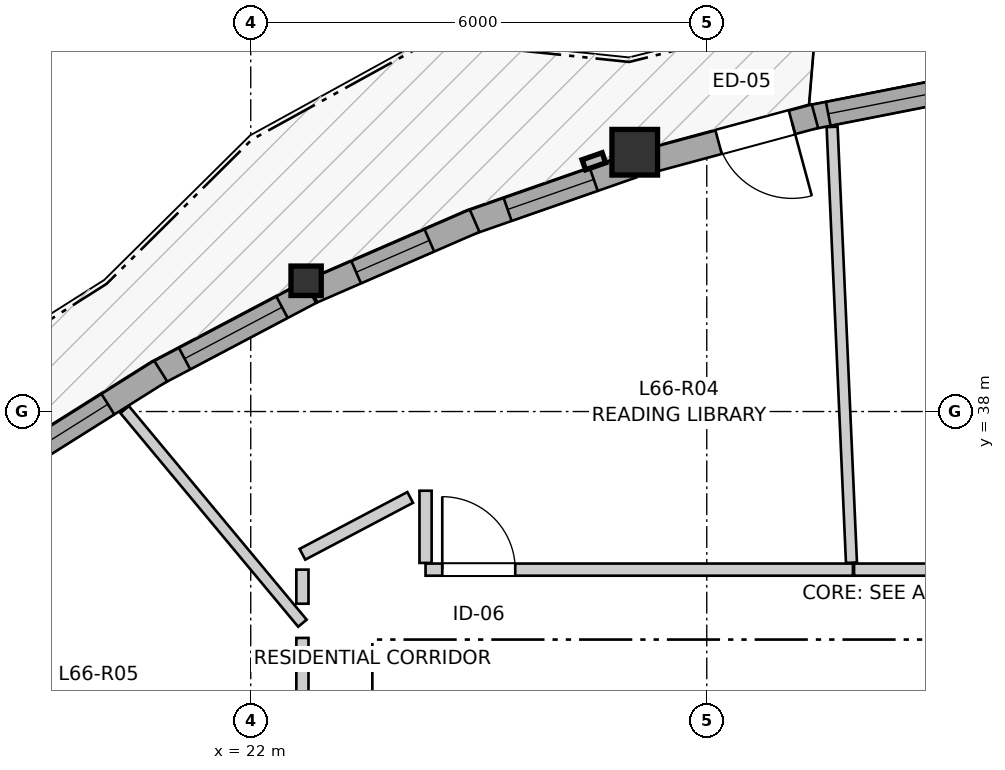
"""IFC4 building model, lengths in metres.
Left out: names, types, materials, properties, quantities, classifications, styles, units other than length and angle.
Written with IfcOpenShell. Run it as: python <this file> out.ifc"""

import sys

from ifc_helpers import new_model, si_unit, direction, frame, frame_2d, origin, origin_2d, place, context, subcontext, project, spatial, rectangle, i_section, extrude, source, transform, mapped, element, fill, save


model = new_model("IFC4")
c1 = context("Model", 3, precision=1e-05, world=origin(), true_north=direction((0.0, 1.0)))
c2 = subcontext(c1, "Body", "Model", "MODEL_VIEW")
j1 = project(units=[si_unit("LENGTHUNIT", "METRE"), si_unit("PLANEANGLEUNIT", "RADIAN")], contexts=[c1])
p1 = place(None, origin())
s1 = spatial("IfcSite", under=j1, at=p1, CompositionType="ELEMENT")
p2 = place(p1, origin())
s2 = spatial("IfcBuilding", under=s1, at=p2, CompositionType="ELEMENT")
p3 = place(p2, frame((0.0, 0.0, 221.2)))
s3 = spatial("IfcBuildingStorey", under=s2, at=p3, CompositionType="ELEMENT", Elevation=221.2)
m1 = source(origin(), c2, "Body", "SweptSolid", [
    extrude(rectangle(XDim=0.6, YDim=0.6, at=origin_2d()), origin(), (0.0, 0.0, 1.0), 2.96),
])
p4 = place(p3, frame((27.052, 41.411, 0.0), z_axis=(0.0, 0.0, 1.0), x_axis=(1.0, 0.0, 0.0)))
e1 = element("IfcColumn", 1, at=p4, inside=s3, PredefinedType="COLUMN", context=c2, shape_type="MappedRepresentation", body=[
    mapped(m1, transform((0.0, 0.0, 0.0), x_axis=(1.0, 0.0, 0.0), y_axis=(0.0, 1.0, 0.0), z_axis=(0.0, 0.0, 1.0), scale=1.0)),
])
m2 = source(origin(), c2, "Body", "SweptSolid", [
    extrude(i_section(OverallWidth=0.398, OverallDepth=0.387, WebThickness=0.019, FlangeThickness=0.03, FilletRadius=0.015, at=origin_2d()), origin(), (0.0, 0.0, 1.0), 2.96),
])
p5 = place(p3, frame((22.729, 39.72, 0.0), z_axis=(0.0, 0.0, 1.0), x_axis=(1.0, 0.0, 0.0)))
e2 = element("IfcColumn", 2, at=p5, inside=s3, PredefinedType="PILASTER", context=c2, shape_type="MappedRepresentation", body=[
    mapped(m2, transform((0.0, 0.0, 0.0), x_axis=(1.0, 0.0, 0.0), y_axis=(0.0, 1.0, 0.0), z_axis=(0.0, 0.0, 1.0), scale=1.0)),
])
p6 = place(p3, frame((31.736, 42.337, 0.0), z_axis=(0.0, 0.0, 1.0), x_axis=(-0.981228566979, -0.192848384345, 0.0)))
e3 = element("IfcWall", 3, at=p6, inside=s3, PredefinedType="SOLIDWALL", context=c2, shape_type="SweptSolid", body=[
    extrude(rectangle(XDim=2.443, YDim=0.32, at=frame_2d((1.222, 0.0))), origin(), (0.0, 0.0, 1.0), 2.58),
])
p7 = place(p6, frame((0.679, 0.0, 0.82)))
e4 = element("IfcOpeningElement", 4, at=p7, cuts=e3, PredefinedType="OPENING", context=c2, shape_type="SweptSolid", body=[
    extrude(rectangle(XDim=1.5, YDim=1.45, at=frame_2d((0.75, 0.725))), frame((0.0, 0.17, 0.0), z_axis=(0.0, -1.0, 0.0), x_axis=(1.0, 0.0, 0.0)), (0.0, 0.0, 1.0), 0.34),
])
p8 = place(p3, frame((29.424, 41.885, 0.0), z_axis=(0.0, 0.0, 1.0), x_axis=(-0.965461343217, -0.260546338976, 0.0)))
e5 = element("IfcWall", 5, at=p8, inside=s3, PredefinedType="SOLIDWALL", context=c2, shape_type="SweptSolid", body=[
    extrude(rectangle(XDim=2.323, YDim=0.32, at=frame_2d((1.162, 0.0))), origin(), (0.0, 0.0, 1.0), 2.58),
])
p9 = place(p8, frame((0.313, 0.0, 0.0)))
e6 = element("IfcOpeningElement", 6, at=p9, cuts=e5, PredefinedType="OPENING", context=c2, shape_type="SweptSolid", body=[
    extrude(rectangle(XDim=1.0, YDim=2.1, at=frame_2d((0.5, 1.05))), frame((0.0, 0.17, 0.0), z_axis=(0.0, -1.0, 0.0), x_axis=(1.0, 0.0, 0.0)), (0.0, 0.0, 1.0), 0.34),
])
p10 = place(p3, frame((27.02, 41.23, 0.0), z_axis=(0.0, 0.0, 1.0), x_axis=(-0.944142960918, -0.329536142705, 0.0)))
e7 = element("IfcWall", 7, at=p10, inside=s3, PredefinedType="SOLIDWALL", context=c2, shape_type="SweptSolid", body=[
    extrude(rectangle(XDim=2.284, YDim=0.32, at=frame_2d((1.142, 0.0))), origin(), (0.0, 0.0, 1.0), 2.58),
])
p11 = place(p10, frame((0.537, 0.0, 0.82)))
e8 = element("IfcOpeningElement", 8, at=p11, cuts=e7, PredefinedType="OPENING", context=c2, shape_type="SweptSolid", body=[
    extrude(rectangle(XDim=1.2, YDim=1.45, at=frame_2d((0.6, 0.725))), frame((0.0, 0.17, 0.0), z_axis=(0.0, -1.0, 0.0), x_axis=(1.0, 0.0, 0.0)), (0.0, 0.0, 1.0), 0.34),
])
p12 = place(p3, frame((24.945, 40.51, 0.0), z_axis=(0.0, 0.0, 1.0), x_axis=(-0.917060051629, -0.39874912126, 0.0)))
e9 = element("IfcWall", 9, at=p12, inside=s3, PredefinedType="SOLIDWALL", context=c2, shape_type="SweptSolid", body=[
    extrude(rectangle(XDim=2.328, YDim=0.32, at=frame_2d((1.164, 0.0))), origin(), (0.0, 0.0, 1.0), 2.58),
])
p13 = place(p12, frame((0.649, 0.0, 0.82)))
e10 = element("IfcOpeningElement", 10, at=p13, cuts=e9, PredefinedType="OPENING", context=c2, shape_type="SweptSolid", body=[
    extrude(rectangle(XDim=1.05, YDim=1.45, at=frame_2d((0.525, 0.725))), frame((0.0, 0.17, 0.0), z_axis=(0.0, -1.0, 0.0), x_axis=(1.0, 0.0, 0.0)), (0.0, 0.0, 1.0), 0.34),
])
p14 = place(p3, frame((22.785, 39.57, 0.0), z_axis=(0.0, 0.0, 1.0), x_axis=(-0.884379914657, -0.466767786541, 0.0)))
e11 = element("IfcWall", 11, at=p14, inside=s3, PredefinedType="SOLIDWALL", context=c2, shape_type="SweptSolid", body=[
    extrude(rectangle(XDim=2.314, YDim=0.32, at=frame_2d((1.157, 0.0))), origin(), (0.0, 0.0, 1.0), 2.58),
])
p15 = place(p14, frame((0.422, 0.0, 0.82)))
e12 = element("IfcOpeningElement", 12, at=p15, cuts=e11, PredefinedType="OPENING", context=c2, shape_type="SweptSolid", body=[
    extrude(rectangle(XDim=1.45, YDim=1.25, at=frame_2d((0.725, 0.625))), frame((0.0, 0.17, 0.0), z_axis=(0.0, -1.0, 0.0), x_axis=(1.0, 0.0, 0.0)), (0.0, 0.0, 1.0), 0.34),
])
p16 = place(p3, frame((20.815, 38.533, 0.0), z_axis=(0.0, 0.0, 1.0), x_axis=(-0.846418054627, -0.532518991963, 0.0)))
e13 = element("IfcWall", 13, at=p16, inside=s3, PredefinedType="SOLIDWALL", context=c2, shape_type="SweptSolid", body=[
    extrude(rectangle(XDim=2.245, YDim=0.32, at=frame_2d((1.122, 0.0))), origin(), (0.0, 0.0, 1.0), 2.58),
])
p17 = place(p16, frame((0.82, 0.0, 0.82)))
e14 = element("IfcOpeningElement", 14, at=p17, cuts=e13, PredefinedType="OPENING", context=c2, shape_type="SweptSolid", body=[
    extrude(rectangle(XDim=1.05, YDim=1.45, at=frame_2d((0.525, 0.725))), frame((0.0, 0.17, 0.0), z_axis=(0.0, -1.0, 0.0), x_axis=(1.0, 0.0, 0.0)), (0.0, 0.0, 1.0), 0.34),
])
p18 = place(p3, frame((24.3, 35.92, 0.0), z_axis=(0.0, 0.0, 1.0), x_axis=(1.0, 0.0, 0.0)))
e15 = element("IfcWall", 15, at=p18, inside=s3, PredefinedType="PARTITIONING", context=c2, shape_type="SweptSolid", body=[
    extrude(rectangle(XDim=5.623, YDim=0.16, at=frame_2d((2.812, 0.0))), origin(), (0.0, 0.0, 1.0), 2.96),
])
p19 = place(p18, frame((0.22, 0.0, 0.0)))
e16 = element("IfcOpeningElement", 16, at=p19, cuts=e15, PredefinedType="OPENING", context=c2, shape_type="SweptSolid", body=[
    extrude(rectangle(XDim=0.96, YDim=2.1, at=frame_2d((0.48, 1.05))), frame((0.0, 0.09, 0.0), z_axis=(0.0, -1.0, 0.0), x_axis=(1.0, 0.0, 0.0)), (0.0, 0.0, 1.0), 0.18),
])
p20 = place(p3, frame((29.938, 35.92, 0.0), z_axis=(0.0, 0.0, 1.0), x_axis=(1.0, 0.0, 0.0)))
e17 = element("IfcWall", 17, at=p20, inside=s3, PredefinedType="PARTITIONING", context=c2, shape_type="SweptSolid", body=[
    extrude(rectangle(XDim=5.103, YDim=0.16, at=frame_2d((2.552, 0.0))), origin(), (0.0, 0.0, 1.0), 2.96),
])
p21 = place(p20, frame((1.878, 0.0, 0.0)))
e18 = element("IfcOpeningElement", 18, at=p21, cuts=e17, PredefinedType="OPENING", context=c2, shape_type="SweptSolid", body=[
    extrude(rectangle(XDim=1.3, YDim=2.1, at=frame_2d((0.65, 1.05))), frame((0.0, 0.09, 0.0), z_axis=(0.0, -1.0, 0.0), x_axis=(1.0, 0.0, 0.0)), (0.0, 0.0, 1.0), 0.18),
])
p22 = place(p3, frame((29.649, 41.745, 0.0), z_axis=(0.0, 0.0, 1.0), x_axis=(0.044327022296, -0.999017074476, 0.0)))
e19 = element("IfcWall", 19, at=p22, inside=s3, PredefinedType="PARTITIONING", context=c2, shape_type="SweptSolid", body=[
    extrude(rectangle(XDim=5.739, YDim=0.145, at=frame_2d((2.87, 0.0))), origin(), (0.0, 0.0, 1.0), 2.96),
])
p23 = place(p3, frame((20.341, 38.025, 0.0), z_axis=(0.0, 0.0, 1.0), x_axis=(0.639731122463, -0.768598784121, 0.0)))
e20 = element("IfcWall", 20, at=p23, inside=s3, PredefinedType="PARTITIONING", context=c2, shape_type="SweptSolid", body=[
    extrude(rectangle(XDim=3.656, YDim=0.145, at=frame_2d((1.828, 0.0))), origin(), (0.0, 0.0, 1.0), 2.96),
])
p24 = place(p3, frame((22.68, 36.122, 0.0), z_axis=(0.0, 0.0, 1.0), x_axis=(0.884468554818, 0.466599802335, 0.0)))
e21 = element("IfcWall", 21, at=p24, inside=s3, PredefinedType="PARTITIONING", context=c2, shape_type="SweptSolid", body=[
    extrude(rectangle(XDim=1.603, YDim=0.16, at=frame_2d((0.802, 0.0))), origin(), (0.0, 0.0, 1.0), 2.96),
])
p25 = place(p3, frame((24.3, 36.008, 0.0), z_axis=(0.0, 0.0, 1.0), x_axis=(0.0, 1.0, 0.0)))
e22 = element("IfcWall", 22, at=p25, inside=s3, PredefinedType="PARTITIONING", context=c2, shape_type="SweptSolid", body=[
    extrude(rectangle(XDim=0.95, YDim=0.16, at=frame_2d((0.475, 0.0))), origin(), (0.0, 0.0, 1.0), 2.96),
])
p26 = place(p3, frame((22.68, 34.315, 0.0), z_axis=(0.0, 0.0, 1.0), x_axis=(0.0, 1.0, 0.0)))
e23 = element("IfcWall", 23, at=p26, inside=s3, PredefinedType="PARTITIONING", context=c2, shape_type="SweptSolid", body=[
    extrude(rectangle(XDim=0.707, YDim=0.16, at=frame_2d((0.353, 0.0))), origin(), (0.0, 0.0, 1.0), 2.96),
])
p27 = place(p3, frame((22.68, 35.471, 0.0), z_axis=(0.0, 0.0, 1.0), x_axis=(0.0, 1.0, 0.0)))
e24 = element("IfcWall", 24, at=p27, inside=s3, PredefinedType="PARTITIONING", context=c2, shape_type="SweptSolid", body=[
    extrude(rectangle(XDim=0.448, YDim=0.16, at=frame_2d((0.224, 0.0))), origin(), (0.0, 0.0, 1.0), 2.96),
])
m3 = source(origin(), c2, "Body", "SweptSolid", [
    extrude(rectangle(XDim=1.5, YDim=1.45, at=frame_2d((0.75, 0.725))), frame((0.0, 0.03, 0.0), z_axis=(0.0, -1.0, 0.0), x_axis=(1.0, 0.0, 0.0)), (0.0, 0.0, 1.0), 0.06),
])
p28 = place(p7, origin())
e25 = element("IfcWindow", 25, at=p28, inside=s3, PartitioningType="SINGLE_PANEL", PredefinedType="WINDOW", context=c2, shape_type="MappedRepresentation", body=[
    mapped(m3, transform((0.0, 0.0, 0.0), x_axis=(1.0, 0.0, 0.0), y_axis=(0.0, 1.0, 0.0), z_axis=(0.0, 0.0, 1.0), scale=1.0)),
])
fill(e4, e25)
m4 = source(origin(), c2, "Body", "SweptSolid", [
    extrude(rectangle(XDim=1.2, YDim=1.45, at=frame_2d((0.6, 0.725))), frame((0.0, 0.03, 0.0), z_axis=(0.0, -1.0, 0.0), x_axis=(1.0, 0.0, 0.0)), (0.0, 0.0, 1.0), 0.06),
])
p29 = place(p11, origin())
e26 = element("IfcWindow", 26, at=p29, inside=s3, PartitioningType="SINGLE_PANEL", PredefinedType="WINDOW", context=c2, shape_type="MappedRepresentation", body=[
    mapped(m4, transform((0.0, 0.0, 0.0), x_axis=(1.0, 0.0, 0.0), y_axis=(0.0, 1.0, 0.0), z_axis=(0.0, 0.0, 1.0), scale=1.0)),
])
fill(e8, e26)
m5 = source(origin(), c2, "Body", "SweptSolid", [
    extrude(rectangle(XDim=1.05, YDim=1.45, at=frame_2d((0.525, 0.725))), frame((0.0, 0.03, 0.0), z_axis=(0.0, -1.0, 0.0), x_axis=(1.0, 0.0, 0.0)), (0.0, 0.0, 1.0), 0.06),
])
p30 = place(p13, origin())
e27 = element("IfcWindow", 27, at=p30, inside=s3, PartitioningType="SINGLE_PANEL", PredefinedType="WINDOW", context=c2, shape_type="MappedRepresentation", body=[
    mapped(m5, transform((0.0, 0.0, 0.0), x_axis=(1.0, 0.0, 0.0), y_axis=(0.0, 1.0, 0.0), z_axis=(0.0, 0.0, 1.0), scale=1.0)),
])
fill(e10, e27)
m6 = source(origin(), c2, "Body", "SweptSolid", [
    extrude(rectangle(XDim=1.45, YDim=1.25, at=frame_2d((0.725, 0.625))), frame((0.0, 0.03, 0.0), z_axis=(0.0, -1.0, 0.0), x_axis=(1.0, 0.0, 0.0)), (0.0, 0.0, 1.0), 0.06),
])
p31 = place(p15, origin())
e28 = element("IfcWindow", 28, at=p31, inside=s3, PartitioningType="SINGLE_PANEL", PredefinedType="WINDOW", context=c2, shape_type="MappedRepresentation", body=[
    mapped(m6, transform((0.0, 0.0, 0.0), x_axis=(1.0, 0.0, 0.0), y_axis=(0.0, 1.0, 0.0), z_axis=(0.0, 0.0, 1.0), scale=1.0)),
])
fill(e12, e28)
p32 = place(p17, origin())
e29 = element("IfcWindow", 29, at=p32, inside=s3, PartitioningType="SINGLE_PANEL", PredefinedType="WINDOW", context=c2, shape_type="MappedRepresentation", body=[
    mapped(m5, transform((0.0, 0.0, 0.0), x_axis=(1.0, 0.0, 0.0), y_axis=(0.0, 1.0, 0.0), z_axis=(0.0, 0.0, 1.0), scale=1.0)),
])
fill(e14, e29)
m7 = source(origin(), c2, "Body", "SweptSolid", [
    extrude(rectangle(XDim=1.0, YDim=2.1, at=frame_2d((0.5, 1.05))), frame((0.0, 0.025, 0.0), z_axis=(0.0, -1.0, 0.0), x_axis=(1.0, 0.0, 0.0)), (0.0, 0.0, 1.0), 0.05),
])
p33 = place(p9, origin())
e30 = element("IfcDoor", 30, at=p33, inside=s3, OperationType="SINGLE_SWING_LEFT", PredefinedType="DOOR", context=c2, shape_type="MappedRepresentation", body=[
    mapped(m7, transform((0.0, 0.0, 0.0), x_axis=(1.0, 0.0, 0.0), y_axis=(0.0, 1.0, 0.0), z_axis=(0.0, 0.0, 1.0), scale=1.0)),
])
fill(e6, e30)
m8 = source(origin(), c2, "Body", "SweptSolid", [
    extrude(rectangle(XDim=0.96, YDim=2.1, at=frame_2d((0.48, 1.05))), frame((0.0, 0.025, 0.0), z_axis=(0.0, -1.0, 0.0), x_axis=(1.0, 0.0, 0.0)), (0.0, 0.0, 1.0), 0.05),
])
p34 = place(p19, origin())
e31 = element("IfcDoor", 31, at=p34, inside=s3, OperationType="SINGLE_SWING_LEFT", PredefinedType="DOOR", context=c2, shape_type="MappedRepresentation", body=[
    mapped(m8, transform((0.0, 0.0, 0.0), x_axis=(1.0, 0.0, 0.0), y_axis=(0.0, 1.0, 0.0), z_axis=(0.0, 0.0, 1.0), scale=1.0)),
])
fill(e16, e31)
save(model, sys.argv[1])
